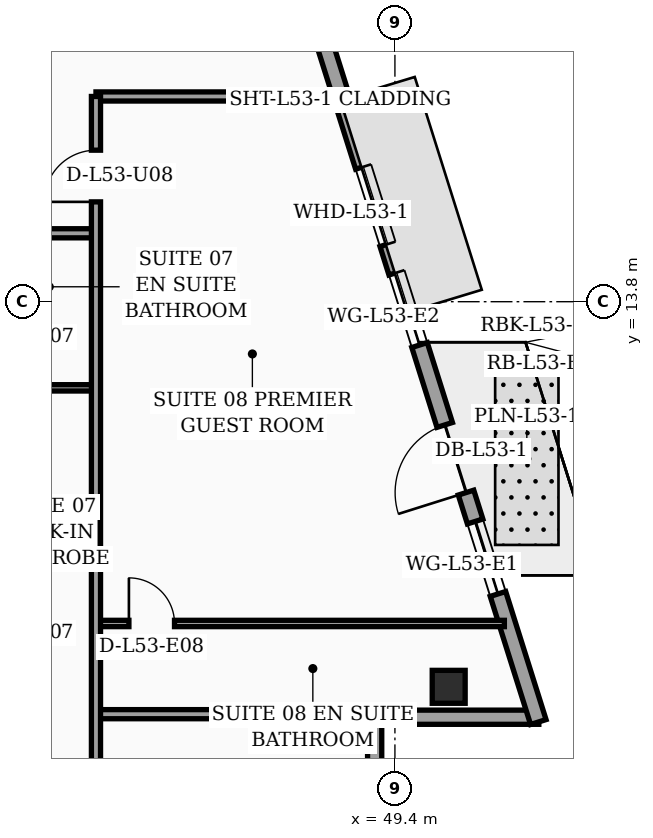
"""IFC4 building model, lengths in metres.
Left out: names, types, materials, properties, quantities, classifications, styles, units other than length and angle.
Written with IfcOpenShell. Run it as: python <this file> out.ifc"""

import sys

from ifc_helpers import new_model, si_unit, direction, frame, frame_2d, origin, origin_2d, place, context, subcontext, project, spatial, rectangle, hollow_rectangle, extrude, element, fill, save


model = new_model("IFC4")
c1 = context("Model", 3, precision=1e-05, world=origin(), true_north=direction((0.0, 1.0)))
c2 = subcontext(c1, "Body", "Model", "MODEL_VIEW")
j1 = project(units=[si_unit("LENGTHUNIT", "METRE"), si_unit("PLANEANGLEUNIT", "RADIAN")], contexts=[c1])
p1 = place(None, origin())
s1 = spatial("IfcSite", under=j1, at=p1, CompositionType="ELEMENT")
p2 = place(p1, origin())
s2 = spatial("IfcBuilding", under=s1, at=p2, CompositionType="ELEMENT")
p3 = place(p2, frame((0.0, 0.0, 214.8)))
s3 = spatial("IfcBuildingStorey", under=s2, at=p3, CompositionType="ELEMENT", Elevation=214.8)
p4 = place(p3, frame((50.461, 6.2, 0.0), z_axis=(0.0, 0.0, 1.0), x_axis=(1.0, 0.0, 0.0)))
e1 = element("IfcColumn", 1, at=p4, inside=s3, PredefinedType="COLUMN", context=c2, shape_type="SweptSolid", body=[
    extrude(hollow_rectangle(XDim=0.65, YDim=0.65, WallThickness=0.028, at=origin_2d()), origin(), (0.0, 0.0, 1.0), 4.05),
])
p5 = place(p3, frame((49.0, 2.52, 0.0), z_axis=(0.0, 0.0, 1.0), x_axis=(0.0, 1.0, 0.0)))
e2 = element("IfcWall", 2, at=p5, inside=s3, PredefinedType="SOLIDWALL", context=c2, shape_type="SweptSolid", body=[
    extrude(rectangle(XDim=2.94, YDim=0.28, at=frame_2d((1.47, 0.0))), origin(), (0.0, 0.0, 1.0), 2.35),
])
p6 = place(p3, frame((48.86, 5.6, 0.0), z_axis=(0.0, 0.0, 1.0), x_axis=(1.0, 0.0, 0.0)))
e3 = element("IfcWall", 3, at=p6, inside=s3, PredefinedType="SOLIDWALL", context=c2, shape_type="SweptSolid", body=[
    extrude(rectangle(XDim=3.38, YDim=0.28, at=frame_2d((1.69, 0.0))), origin(), (0.0, 0.0, 1.0), 2.35),
])
p7 = place(p3, frame((52.23, 5.505, 0.0), z_axis=(0.0, 0.0, 1.0), x_axis=(-0.300509063924, 0.953778958931, 0.0)))
e4 = element("IfcWall", 4, at=p7, inside=s3, PredefinedType="SOLIDWALL", context=c2, shape_type="SweptSolid", body=[
    extrude(rectangle(XDim=30.814, YDim=0.32, at=frame_2d((15.407, 0.0))), origin(), (0.0, 0.0, 1.0), 4.05),
])
p8 = place(p7, frame((4.747, 0.0, 0.0)))
e5 = element("IfcOpeningElement", 5, at=p8, cuts=e4, PredefinedType="OPENING", context=c2, shape_type="SweptSolid", body=[
    extrude(rectangle(XDim=1.4, YDim=2.25, at=frame_2d((0.7, 1.125))), frame((0.0, 0.17, 0.0), z_axis=(0.0, -1.0, 0.0), x_axis=(1.0, 0.0, 0.0)), (0.0, 0.0, 1.0), 0.34),
])
p9 = place(p7, frame((9.889, 0.0, 0.7)))
e6 = element("IfcOpeningElement", 6, at=p9, cuts=e4, PredefinedType="OPENING", context=c2, shape_type="SweptSolid", body=[
    extrude(rectangle(XDim=1.6, YDim=1.65, at=frame_2d((0.8, 0.825))), frame((0.0, 0.17, 0.0), z_axis=(0.0, -1.0, 0.0), x_axis=(1.0, 0.0, 0.0)), (0.0, 0.0, 1.0), 0.34),
])
p10 = place(p7, frame((18.696, 0.0, 0.7)))
e7 = element("IfcOpeningElement", 7, at=p10, cuts=e4, PredefinedType="OPENING", context=c2, shape_type="SweptSolid", body=[
    extrude(rectangle(XDim=1.6, YDim=1.65, at=frame_2d((0.8, 0.825))), frame((0.0, 0.17, 0.0), z_axis=(0.0, -1.0, 0.0), x_axis=(1.0, 0.0, 0.0)), (0.0, 0.0, 1.0), 0.34),
])
p11 = place(p7, frame((2.65, 0.0, 0.75)))
e8 = element("IfcOpeningElement", 8, at=p11, cuts=e4, PredefinedType="OPENING", context=c2, shape_type="SweptSolid", body=[
    extrude(rectangle(XDim=1.5, YDim=1.6, at=frame_2d((0.75, 0.8))), frame((0.0, 0.17, 0.0), z_axis=(0.0, -1.0, 0.0), x_axis=(1.0, 0.0, 0.0)), (0.0, 0.0, 1.0), 0.34),
])
p12 = place(p7, frame((7.8, 0.0, 0.75)))
e9 = element("IfcOpeningElement", 9, at=p12, cuts=e4, PredefinedType="OPENING", context=c2, shape_type="SweptSolid", body=[
    extrude(rectangle(XDim=1.5, YDim=1.6, at=frame_2d((0.75, 0.8))), frame((0.0, 0.17, 0.0), z_axis=(0.0, -1.0, 0.0), x_axis=(1.0, 0.0, 0.0)), (0.0, 0.0, 1.0), 0.34),
])
p13 = place(p7, frame((14.0, 0.0, 0.75)))
e10 = element("IfcOpeningElement", 10, at=p13, cuts=e4, PredefinedType="OPENING", context=c2, shape_type="SweptSolid", body=[
    extrude(rectangle(XDim=1.5, YDim=1.6, at=frame_2d((0.75, 0.8))), frame((0.0, 0.17, 0.0), z_axis=(0.0, -1.0, 0.0), x_axis=(1.0, 0.0, 0.0)), (0.0, 0.0, 1.0), 0.34),
])
p14 = place(p7, frame((16.55, 0.0, 0.75)))
e11 = element("IfcOpeningElement", 11, at=p14, cuts=e4, PredefinedType="OPENING", context=c2, shape_type="SweptSolid", body=[
    extrude(rectangle(XDim=1.5, YDim=1.6, at=frame_2d((0.75, 0.8))), frame((0.0, 0.17, 0.0), z_axis=(0.0, -1.0, 0.0), x_axis=(1.0, 0.0, 0.0)), (0.0, 0.0, 1.0), 0.34),
])
p15 = place(p7, frame((20.75, 0.0, 0.75)))
e12 = element("IfcOpeningElement", 12, at=p15, cuts=e4, PredefinedType="OPENING", context=c2, shape_type="SweptSolid", body=[
    extrude(rectangle(XDim=1.5, YDim=1.6, at=frame_2d((0.75, 0.8))), frame((0.0, 0.17, 0.0), z_axis=(0.0, -1.0, 0.0), x_axis=(1.0, 0.0, 0.0)), (0.0, 0.0, 1.0), 0.34),
])
p16 = place(p7, frame((23.3, 0.0, 0.75)))
e13 = element("IfcOpeningElement", 13, at=p16, cuts=e4, PredefinedType="OPENING", context=c2, shape_type="SweptSolid", body=[
    extrude(rectangle(XDim=1.5, YDim=1.6, at=frame_2d((0.75, 0.8))), frame((0.0, 0.17, 0.0), z_axis=(0.0, -1.0, 0.0), x_axis=(1.0, 0.0, 0.0)), (0.0, 0.0, 1.0), 0.34),
])
p17 = place(p7, frame((26.4, 0.0, 0.75)))
e14 = element("IfcOpeningElement", 14, at=p17, cuts=e4, PredefinedType="OPENING", context=c2, shape_type="SweptSolid", body=[
    extrude(rectangle(XDim=1.5, YDim=1.6, at=frame_2d((0.75, 0.8))), frame((0.0, 0.17, 0.0), z_axis=(0.0, -1.0, 0.0), x_axis=(1.0, 0.0, 0.0)), (0.0, 0.0, 1.0), 0.34),
])
p18 = place(p3, frame((41.57, 12.1, 0.0), z_axis=(0.0, 0.0, 1.0), x_axis=(1.0, 0.0, 0.0)))
e15 = element("IfcWall", 15, at=p18, inside=s3, PredefinedType="PARTITIONING", context=c2, shape_type="SweptSolid", body=[
    extrude(rectangle(XDim=1.93, YDim=0.125, at=frame_2d((0.965, 0.0))), origin(), (0.0, 0.0, 1.0), 4.05),
])
p19 = place(p3, frame((32.4, 15.15, 0.0), z_axis=(0.0, 0.0, 1.0), x_axis=(1.0, 0.0, 0.0)))
e16 = element("IfcWall", 16, at=p19, inside=s3, PredefinedType="PARTITIONING", context=c2, shape_type="SweptSolid", body=[
    extrude(rectangle(XDim=11.1, YDim=0.18, at=frame_2d((5.55, 0.0))), origin(), (0.0, 0.0, 1.0), 2.35),
])
p20 = place(p19, frame((1.03, 0.0, 0.0)))
e17 = element("IfcOpeningElement", 17, at=p20, cuts=e16, PredefinedType="OPENING", context=c2, shape_type="SweptSolid", body=[
    extrude(rectangle(XDim=1.02, YDim=2.2, at=frame_2d((0.51, 1.1))), frame((0.0, 0.1, 0.0), z_axis=(0.0, -1.0, 0.0), x_axis=(1.0, 0.0, 0.0)), (0.0, 0.0, 1.0), 0.2),
])
p21 = place(p19, frame((6.48, 0.0, 0.0)))
e18 = element("IfcOpeningElement", 18, at=p21, cuts=e16, PredefinedType="OPENING", context=c2, shape_type="SweptSolid", body=[
    extrude(rectangle(XDim=1.02, YDim=2.2, at=frame_2d((0.51, 1.1))), frame((0.0, 0.1, 0.0), z_axis=(0.0, -1.0, 0.0), x_axis=(1.0, 0.0, 0.0)), (0.0, 0.0, 1.0), 0.2),
])
p22 = place(p3, frame((43.5, 7.45, 0.0), z_axis=(0.0, 0.0, 1.0), x_axis=(1.0, 0.0, 0.0)))
e19 = element("IfcWall", 19, at=p22, inside=s3, PredefinedType="PARTITIONING", context=c2, shape_type="SweptSolid", body=[
    extrude(rectangle(XDim=8.06, YDim=0.125, at=frame_2d((4.03, 0.0))), origin(), (0.0, 0.0, 1.0), 2.35),
])
p23 = place(p22, frame((0.65, 0.0, 0.0)))
e20 = element("IfcOpeningElement", 20, at=p23, cuts=e19, PredefinedType="OPENING", context=c2, shape_type="SweptSolid", body=[
    extrude(rectangle(XDim=0.9, YDim=2.15, at=frame_2d((0.45, 1.075))), frame((0.0, 0.073, 0.0), z_axis=(0.0, -1.0, 0.0), x_axis=(1.0, 0.0, 0.0)), (0.0, 0.0, 1.0), 0.145),
])
p24 = place(p3, frame((43.5, 5.66, 0.0), z_axis=(0.0, 0.0, 1.0), x_axis=(1.0, 0.0, 0.0)))
e21 = element("IfcWall", 21, at=p24, inside=s3, PredefinedType="PARTITIONING", context=c2, shape_type="SweptSolid", body=[
    extrude(rectangle(XDim=5.5, YDim=0.18, at=frame_2d((2.75, 0.0))), origin(), (0.0, 0.0, 1.0), 2.35),
])
p25 = place(p3, frame((43.5, 17.85, 0.0), z_axis=(0.0, 0.0, 1.0), x_axis=(1.0, 0.0, 0.0)))
e22 = element("IfcWall", 22, at=p25, inside=s3, PredefinedType="PARTITIONING", context=c2, shape_type="SweptSolid", body=[
    extrude(rectangle(XDim=4.78, YDim=0.18, at=frame_2d((2.39, 0.0))), origin(), (0.0, 0.0, 1.0), 2.35),
])
p26 = place(p3, frame((43.5, 2.44, 0.0), z_axis=(0.0, 0.0, 1.0), x_axis=(0.0, 1.0, 0.0)))
e23 = element("IfcWall", 23, at=p26, inside=s3, PredefinedType="PARTITIONING", context=c2, shape_type="SweptSolid", body=[
    extrude(rectangle(XDim=15.41, YDim=0.18, at=frame_2d((7.705, 0.0))), origin(), (0.0, 0.0, 1.0), 2.35),
])
p27 = place(p26, frame((13.33, 0.0, 0.0)))
e24 = element("IfcOpeningElement", 24, at=p27, cuts=e23, PredefinedType="OPENING", context=c2, shape_type="SweptSolid", body=[
    extrude(rectangle(XDim=1.02, YDim=2.2, at=frame_2d((0.51, 1.1))), frame((0.0, 0.1, 0.0), z_axis=(0.0, -1.0, 0.0), x_axis=(1.0, 0.0, 0.0)), (0.0, 0.0, 1.0), 0.2),
])
p28 = place(p8, origin())
e25 = element("IfcDoor", 25, at=p28, inside=s3, OperationType="SINGLE_SWING_LEFT", PredefinedType="DOOR", context=c2, shape_type="SweptSolid", body=[
    extrude(rectangle(XDim=1.4, YDim=2.25, at=frame_2d((0.7, 1.125))), frame((0.0, 0.025, 0.0), z_axis=(0.0, -1.0, 0.0), x_axis=(1.0, 0.0, 0.0)), (0.0, 0.0, 1.0), 0.05),
])
fill(e5, e25)
p29 = place(p9, origin())
e26 = element("IfcWindow", 26, at=p29, inside=s3, PartitioningType="SINGLE_PANEL", PredefinedType="WINDOW", context=c2, shape_type="SweptSolid", body=[
    extrude(rectangle(XDim=1.6, YDim=1.65, at=frame_2d((0.8, 0.825))), frame((0.0, 0.03, 0.0), z_axis=(0.0, -1.0, 0.0), x_axis=(1.0, 0.0, 0.0)), (0.0, 0.0, 1.0), 0.06),
])
fill(e6, e26)
p30 = place(p11, origin())
e27 = element("IfcWindow", 27, at=p30, inside=s3, PartitioningType="SINGLE_PANEL", PredefinedType="WINDOW", context=c2, shape_type="SweptSolid", body=[
    extrude(rectangle(XDim=1.5, YDim=1.6, at=frame_2d((0.75, 0.8))), frame((0.0, 0.03, 0.0), z_axis=(0.0, -1.0, 0.0), x_axis=(1.0, 0.0, 0.0)), (0.0, 0.0, 1.0), 0.06),
])
fill(e8, e27)
p31 = place(p12, origin())
e28 = element("IfcWindow", 28, at=p31, inside=s3, PartitioningType="SINGLE_PANEL", PredefinedType="WINDOW", context=c2, shape_type="SweptSolid", body=[
    extrude(rectangle(XDim=1.5, YDim=1.6, at=frame_2d((0.75, 0.8))), frame((0.0, 0.03, 0.0), z_axis=(0.0, -1.0, 0.0), x_axis=(1.0, 0.0, 0.0)), (0.0, 0.0, 1.0), 0.06),
])
fill(e9, e28)
p32 = place(p23, origin())
e29 = element("IfcDoor", 29, at=p32, inside=s3, OperationType="SINGLE_SWING_LEFT", PredefinedType="DOOR", context=c2, shape_type="SweptSolid", body=[
    extrude(rectangle(XDim=0.9, YDim=2.15, at=frame_2d((0.45, 1.075))), frame((0.0, 0.025, 0.0), z_axis=(0.0, -1.0, 0.0), x_axis=(1.0, 0.0, 0.0)), (0.0, 0.0, 1.0), 0.05),
])
fill(e20, e29)
p33 = place(p27, origin())
e30 = element("IfcDoor", 30, at=p33, inside=s3, OperationType="SINGLE_SWING_LEFT", PredefinedType="DOOR", context=c2, shape_type="SweptSolid", body=[
    extrude(rectangle(XDim=1.02, YDim=2.2, at=frame_2d((0.51, 1.1))), frame((0.0, 0.025, 0.0), z_axis=(0.0, -1.0, 0.0), x_axis=(1.0, 0.0, 0.0)), (0.0, 0.0, 1.0), 0.05),
])
fill(e24, e30)
save(model, sys.argv[1])
